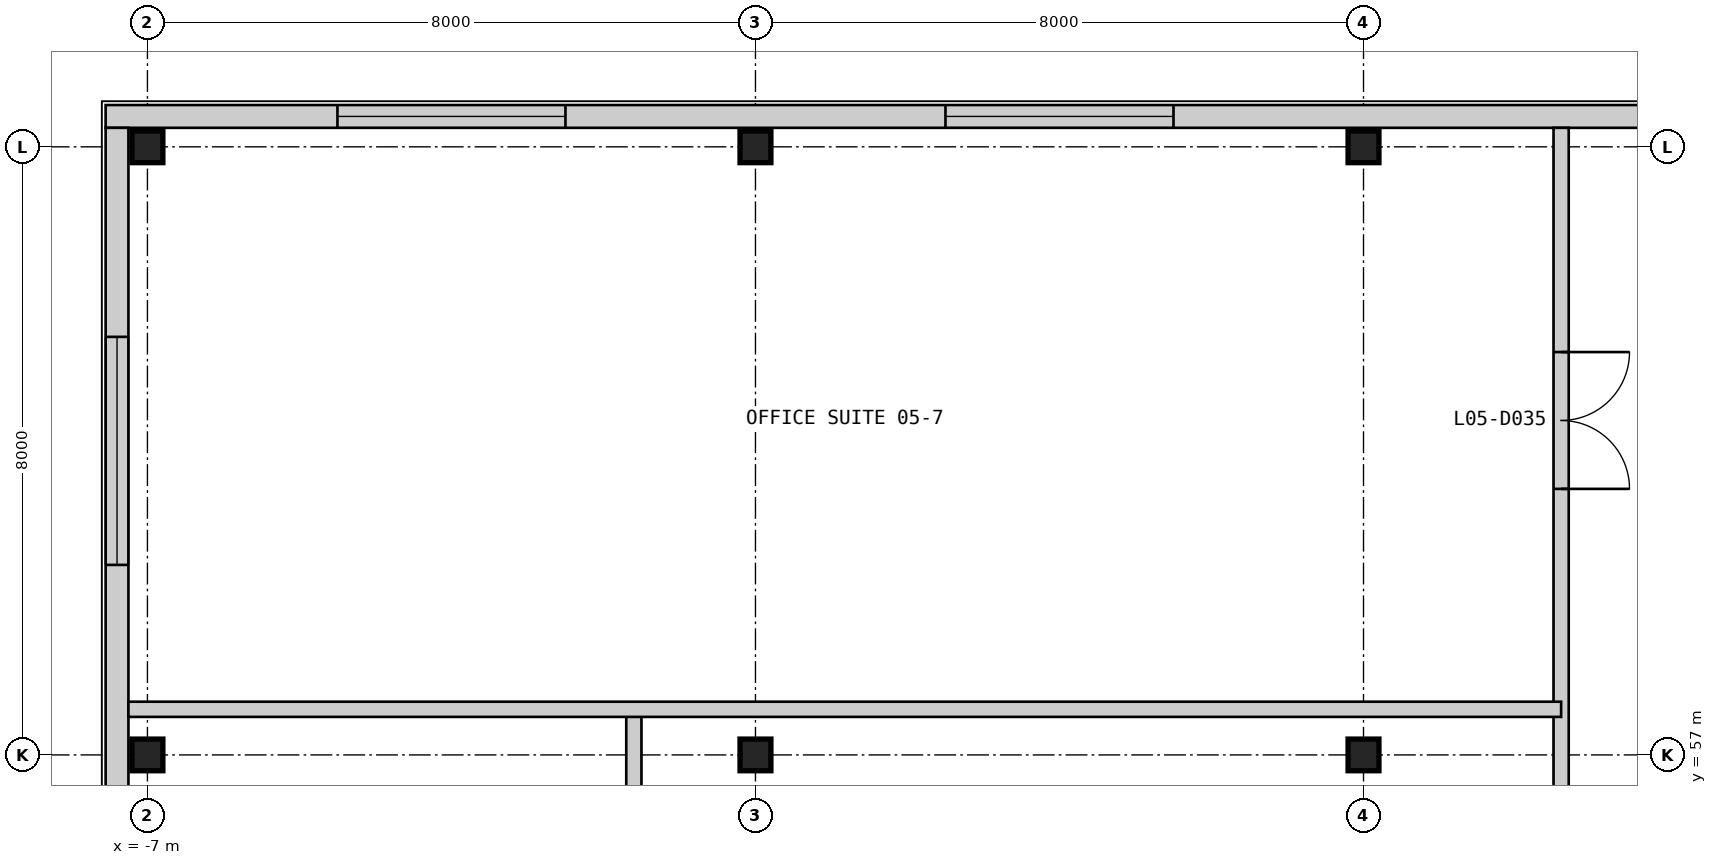
"""IFC4 building model, lengths in metres.
Left out: names, types, materials, properties, quantities, classifications, styles, units other than length and angle.
Written with IfcOpenShell. Run it as: python <this file> out.ifc"""

import sys

from ifc_helpers import new_model, si_unit, direction, frame, frame_2d, origin, origin_2d, place, context, subcontext, project, spatial, rectangle, i_section, extrude, element, fill, save


model = new_model("IFC4")
c1 = context("Model", 3, precision=1e-05, world=origin(), true_north=direction((0.0, 1.0)))
c2 = subcontext(c1, "Body", "Model", "MODEL_VIEW")
j1 = project(units=[si_unit("LENGTHUNIT", "METRE"), si_unit("PLANEANGLEUNIT", "RADIAN")], contexts=[c1])
p1 = place(None, origin())
s1 = spatial("IfcSite", under=j1, at=p1, CompositionType="ELEMENT")
p2 = place(p1, origin())
s2 = spatial("IfcBuilding", under=s1, at=p2, CompositionType="ELEMENT")
p3 = place(p2, frame((0.0, 0.0, 26.2)))
s3 = spatial("IfcBuildingStorey", under=s2, at=p3, CompositionType="ELEMENT", Elevation=26.2)
for number, where, z_axis, x_axis in (
    (1, (-7.0, 57.0, 0.0), (0.0, 0.0, 1.0), (1.0, 0.0, 0.0)),
    (2, (-7.0, 65.0, 0.0), (0.0, 0.0, 1.0), (1.0, 0.0, 0.0)),
    (3, (1.0, 57.0, 0.0), (0.0, 0.0, 1.0), (1.0, 0.0, 0.0)),
    (4, (1.0, 65.0, 0.0), (0.0, 0.0, 1.0), (1.0, 0.0, 0.0)),
    (5, (9.0, 57.0, 0.0), (0.0, 0.0, 1.0), (1.0, 0.0, 0.0)),
    (6, (9.0, 65.0, 0.0), (0.0, 0.0, 1.0), (1.0, 0.0, 0.0)),
):
    element("IfcColumn", number, at=place(p3, frame(where, z_axis=z_axis, x_axis=x_axis)), inside=s3, PredefinedType="COLUMN", context=c2, shape_type="SweptSolid", body=[
        extrude(i_section(OverallWidth=0.406, OverallDepth=0.417, WebThickness=0.03, FlangeThickness=0.048, at=origin_2d()), origin(), (0.0, 0.0, 1.0), 4.8),
    ])
p4 = place(p3, frame((57.55, 65.4, 0.0), z_axis=(0.0, 0.0, 1.0), x_axis=(-1.0, 0.0, 0.0)))
e7 = element("IfcWall", 7, at=p4, inside=s3, PredefinedType="SOLIDWALL", context=c2, shape_type="SweptSolid", body=[
    extrude(rectangle(XDim=65.1, YDim=0.3, at=frame_2d((32.55, 0.0))), origin(), (0.0, 0.0, 1.0), 4.5),
])
p5 = place(p4, frame((59.05, 0.0, 0.9)))
e8 = element("IfcOpeningElement", 8, at=p5, cuts=e7, PredefinedType="OPENING", context=c2, shape_type="SweptSolid", body=[
    extrude(rectangle(XDim=3.0, YDim=2.4, at=frame_2d((1.5, 1.2))), frame((0.0, 0.16, 0.0), z_axis=(0.0, -1.0, 0.0), x_axis=(1.0, 0.0, 0.0)), (0.0, 0.0, 1.0), 0.32),
])
p6 = place(p4, frame((51.05, 0.0, 0.9)))
e9 = element("IfcOpeningElement", 9, at=p6, cuts=e7, PredefinedType="OPENING", context=c2, shape_type="SweptSolid", body=[
    extrude(rectangle(XDim=3.0, YDim=2.4, at=frame_2d((1.5, 1.2))), frame((0.0, 0.16, 0.0), z_axis=(0.0, -1.0, 0.0), x_axis=(1.0, 0.0, 0.0)), (0.0, 0.0, 1.0), 0.32),
])
p7 = place(p4, frame((37.05, 0.0, 0.9)))
e10 = element("IfcOpeningElement", 10, at=p7, cuts=e7, PredefinedType="OPENING", context=c2, shape_type="SweptSolid", body=[
    extrude(rectangle(XDim=3.0, YDim=2.4, at=frame_2d((1.5, 1.2))), frame((0.0, 0.16, 0.0), z_axis=(0.0, -1.0, 0.0), x_axis=(1.0, 0.0, 0.0)), (0.0, 0.0, 1.0), 0.32),
])
p8 = place(p4, frame((25.05, 0.0, 0.9)))
e11 = element("IfcOpeningElement", 11, at=p8, cuts=e7, PredefinedType="OPENING", context=c2, shape_type="SweptSolid", body=[
    extrude(rectangle(XDim=3.0, YDim=2.4, at=frame_2d((1.5, 1.2))), frame((0.0, 0.16, 0.0), z_axis=(0.0, -1.0, 0.0), x_axis=(1.0, 0.0, 0.0)), (0.0, 0.0, 1.0), 0.32),
])
p9 = place(p4, frame((16.55, 0.0, 0.9)))
e12 = element("IfcOpeningElement", 12, at=p9, cuts=e7, PredefinedType="OPENING", context=c2, shape_type="SweptSolid", body=[
    extrude(rectangle(XDim=3.0, YDim=2.4, at=frame_2d((1.5, 1.2))), frame((0.0, 0.16, 0.0), z_axis=(0.0, -1.0, 0.0), x_axis=(1.0, 0.0, 0.0)), (0.0, 0.0, 1.0), 0.32),
])
p10 = place(p4, frame((10.55, 0.0, 0.9)))
e13 = element("IfcOpeningElement", 13, at=p10, cuts=e7, PredefinedType="OPENING", context=c2, shape_type="SweptSolid", body=[
    extrude(rectangle(XDim=3.0, YDim=2.4, at=frame_2d((1.5, 1.2))), frame((0.0, 0.16, 0.0), z_axis=(0.0, -1.0, 0.0), x_axis=(1.0, 0.0, 0.0)), (0.0, 0.0, 1.0), 0.32),
])
p11 = place(p4, frame((3.05, 0.0, 0.9)))
e14 = element("IfcOpeningElement", 14, at=p11, cuts=e7, PredefinedType="OPENING", context=c2, shape_type="SweptSolid", body=[
    extrude(rectangle(XDim=3.0, YDim=2.4, at=frame_2d((1.5, 1.2))), frame((0.0, 0.16, 0.0), z_axis=(0.0, -1.0, 0.0), x_axis=(1.0, 0.0, 0.0)), (0.0, 0.0, 1.0), 0.32),
])
p12 = place(p3, frame((-7.4, 65.25, 0.0), z_axis=(0.0, 0.0, 1.0), x_axis=(0.0, -1.0, 0.0)))
e15 = element("IfcWall", 15, at=p12, inside=s3, PredefinedType="SOLIDWALL", context=c2, shape_type="SweptSolid", body=[
    extrude(rectangle(XDim=72.5, YDim=0.3, at=frame_2d((36.25, 0.0))), origin(), (0.0, 0.0, 1.0), 4.5),
])
p13 = place(p12, frame((66.75, 0.0, 0.9)))
e16 = element("IfcOpeningElement", 16, at=p13, cuts=e15, PredefinedType="OPENING", context=c2, shape_type="SweptSolid", body=[
    extrude(rectangle(XDim=3.0, YDim=2.4, at=frame_2d((1.5, 1.2))), frame((0.0, 0.16, 0.0), z_axis=(0.0, -1.0, 0.0), x_axis=(1.0, 0.0, 0.0)), (0.0, 0.0, 1.0), 0.32),
])
p14 = place(p12, frame((58.75, 0.0, 0.9)))
e17 = element("IfcOpeningElement", 17, at=p14, cuts=e15, PredefinedType="OPENING", context=c2, shape_type="SweptSolid", body=[
    extrude(rectangle(XDim=3.0, YDim=2.4, at=frame_2d((1.5, 1.2))), frame((0.0, 0.16, 0.0), z_axis=(0.0, -1.0, 0.0), x_axis=(1.0, 0.0, 0.0)), (0.0, 0.0, 1.0), 0.32),
])
p15 = place(p12, frame((44.75, 0.0, 0.9)))
e18 = element("IfcOpeningElement", 18, at=p15, cuts=e15, PredefinedType="OPENING", context=c2, shape_type="SweptSolid", body=[
    extrude(rectangle(XDim=3.0, YDim=2.4, at=frame_2d((1.5, 1.2))), frame((0.0, 0.16, 0.0), z_axis=(0.0, -1.0, 0.0), x_axis=(1.0, 0.0, 0.0)), (0.0, 0.0, 1.0), 0.32),
])
p16 = place(p12, frame((32.75, 0.0, 0.9)))
e19 = element("IfcOpeningElement", 19, at=p16, cuts=e15, PredefinedType="OPENING", context=c2, shape_type="SweptSolid", body=[
    extrude(rectangle(XDim=3.0, YDim=2.4, at=frame_2d((1.5, 1.2))), frame((0.0, 0.16, 0.0), z_axis=(0.0, -1.0, 0.0), x_axis=(1.0, 0.0, 0.0)), (0.0, 0.0, 1.0), 0.32),
])
p17 = place(p12, frame((24.25, 0.0, 0.9)))
e20 = element("IfcOpeningElement", 20, at=p17, cuts=e15, PredefinedType="OPENING", context=c2, shape_type="SweptSolid", body=[
    extrude(rectangle(XDim=3.0, YDim=2.4, at=frame_2d((1.5, 1.2))), frame((0.0, 0.16, 0.0), z_axis=(0.0, -1.0, 0.0), x_axis=(1.0, 0.0, 0.0)), (0.0, 0.0, 1.0), 0.32),
])
p18 = place(p12, frame((18.25, 0.0, 0.9)))
e21 = element("IfcOpeningElement", 21, at=p18, cuts=e15, PredefinedType="OPENING", context=c2, shape_type="SweptSolid", body=[
    extrude(rectangle(XDim=3.0, YDim=2.4, at=frame_2d((1.5, 1.2))), frame((0.0, 0.16, 0.0), z_axis=(0.0, -1.0, 0.0), x_axis=(1.0, 0.0, 0.0)), (0.0, 0.0, 1.0), 0.32),
])
p19 = place(p12, frame((10.75, 0.0, 0.9)))
e22 = element("IfcOpeningElement", 22, at=p19, cuts=e15, PredefinedType="OPENING", context=c2, shape_type="SweptSolid", body=[
    extrude(rectangle(XDim=3.0, YDim=2.4, at=frame_2d((1.5, 1.2))), frame((0.0, 0.16, 0.0), z_axis=(0.0, -1.0, 0.0), x_axis=(1.0, 0.0, 0.0)), (0.0, 0.0, 1.0), 0.32),
])
p20 = place(p12, frame((2.75, 0.0, 0.9)))
e23 = element("IfcOpeningElement", 23, at=p20, cuts=e15, PredefinedType="OPENING", context=c2, shape_type="SweptSolid", body=[
    extrude(rectangle(XDim=3.0, YDim=2.4, at=frame_2d((1.5, 1.2))), frame((0.0, 0.16, 0.0), z_axis=(0.0, -1.0, 0.0), x_axis=(1.0, 0.0, 0.0)), (0.0, 0.0, 1.0), 0.32),
])
p21 = place(p3, frame((-0.6, 34.4, 0.0), z_axis=(0.0, 0.0, 1.0), x_axis=(0.0, 1.0, 0.0)))
e24 = element("IfcWall", 24, at=p21, inside=s3, PredefinedType="PARTITIONING", context=c2, shape_type="SweptSolid", body=[
    extrude(rectangle(XDim=23.2, YDim=0.2, at=frame_2d((11.6, 0.0))), origin(), (0.0, 0.0, 1.0), 4.5),
])
p22 = place(p3, frame((11.6, 43.0, 0.0), z_axis=(0.0, 0.0, 1.0), x_axis=(0.0, 1.0, 0.0)))
e25 = element("IfcWall", 25, at=p22, inside=s3, PredefinedType="PARTITIONING", context=c2, shape_type="SweptSolid", body=[
    extrude(rectangle(XDim=22.25, YDim=0.2, at=frame_2d((11.125, 0.0))), origin(), (0.0, 0.0, 1.0), 4.5),
])
p23 = place(p22, frame((7.175, 0.0, 0.0)))
e26 = element("IfcOpeningElement", 26, at=p23, cuts=e25, PredefinedType="OPENING", context=c2, shape_type="SweptSolid", body=[
    extrude(rectangle(XDim=1.8, YDim=2.4, at=frame_2d((0.9, 1.2))), frame((0.0, 0.11, 0.0), z_axis=(0.0, -1.0, 0.0), x_axis=(1.0, 0.0, 0.0)), (0.0, 0.0, 1.0), 0.22),
])
p24 = place(p22, frame((17.5, 0.0, 0.0)))
e27 = element("IfcOpeningElement", 27, at=p24, cuts=e25, PredefinedType="OPENING", context=c2, shape_type="SweptSolid", body=[
    extrude(rectangle(XDim=1.8, YDim=2.4, at=frame_2d((0.9, 1.2))), frame((0.0, 0.11, 0.0), z_axis=(0.0, -1.0, 0.0), x_axis=(1.0, 0.0, 0.0)), (0.0, 0.0, 1.0), 0.22),
])
p25 = place(p3, frame((-7.25, 57.6, 0.0), z_axis=(0.0, 0.0, 1.0), x_axis=(1.0, 0.0, 0.0)))
e28 = element("IfcWall", 28, at=p25, inside=s3, PredefinedType="PARTITIONING", context=c2, shape_type="SweptSolid", body=[
    extrude(rectangle(XDim=18.85, YDim=0.2, at=frame_2d((9.425, 0.0))), origin(), (0.0, 0.0, 1.0), 4.5),
])
p26 = place(p5, origin())
e29 = element("IfcWindow", 29, at=p26, inside=s3, PartitioningType="SINGLE_PANEL", PredefinedType="WINDOW", context=c2, shape_type="SweptSolid", body=[
    extrude(rectangle(XDim=3.0, YDim=2.4, at=frame_2d((1.5, 1.2))), frame((0.0, 0.03, 0.0), z_axis=(0.0, -1.0, 0.0), x_axis=(1.0, 0.0, 0.0)), (0.0, 0.0, 1.0), 0.06),
])
fill(e8, e29)
p27 = place(p6, origin())
e30 = element("IfcWindow", 30, at=p27, inside=s3, PartitioningType="SINGLE_PANEL", PredefinedType="WINDOW", context=c2, shape_type="SweptSolid", body=[
    extrude(rectangle(XDim=3.0, YDim=2.4, at=frame_2d((1.5, 1.2))), frame((0.0, 0.03, 0.0), z_axis=(0.0, -1.0, 0.0), x_axis=(1.0, 0.0, 0.0)), (0.0, 0.0, 1.0), 0.06),
])
fill(e9, e30)
p28 = place(p20, origin())
e31 = element("IfcWindow", 31, at=p28, inside=s3, PartitioningType="SINGLE_PANEL", PredefinedType="WINDOW", context=c2, shape_type="SweptSolid", body=[
    extrude(rectangle(XDim=3.0, YDim=2.4, at=frame_2d((1.5, 1.2))), frame((0.0, 0.03, 0.0), z_axis=(0.0, -1.0, 0.0), x_axis=(1.0, 0.0, 0.0)), (0.0, 0.0, 1.0), 0.06),
])
fill(e23, e31)
p29 = place(p24, frame((1.8, 0.0, 0.0), z_axis=(0.0, 0.0, 1.0), x_axis=(-1.0, 0.0, 0.0)))
e32 = element("IfcDoor", 32, at=p29, inside=s3, OperationType="DOUBLE_DOOR_SINGLE_SWING", PredefinedType="DOOR", context=c2, shape_type="SweptSolid", body=[
    extrude(rectangle(XDim=1.8, YDim=2.4, at=frame_2d((0.9, 1.2))), frame((0.0, 0.025, 0.0), z_axis=(0.0, -1.0, 0.0), x_axis=(1.0, 0.0, 0.0)), (0.0, 0.0, 1.0), 0.05),
])
fill(e27, e32)
save(model, sys.argv[1])
